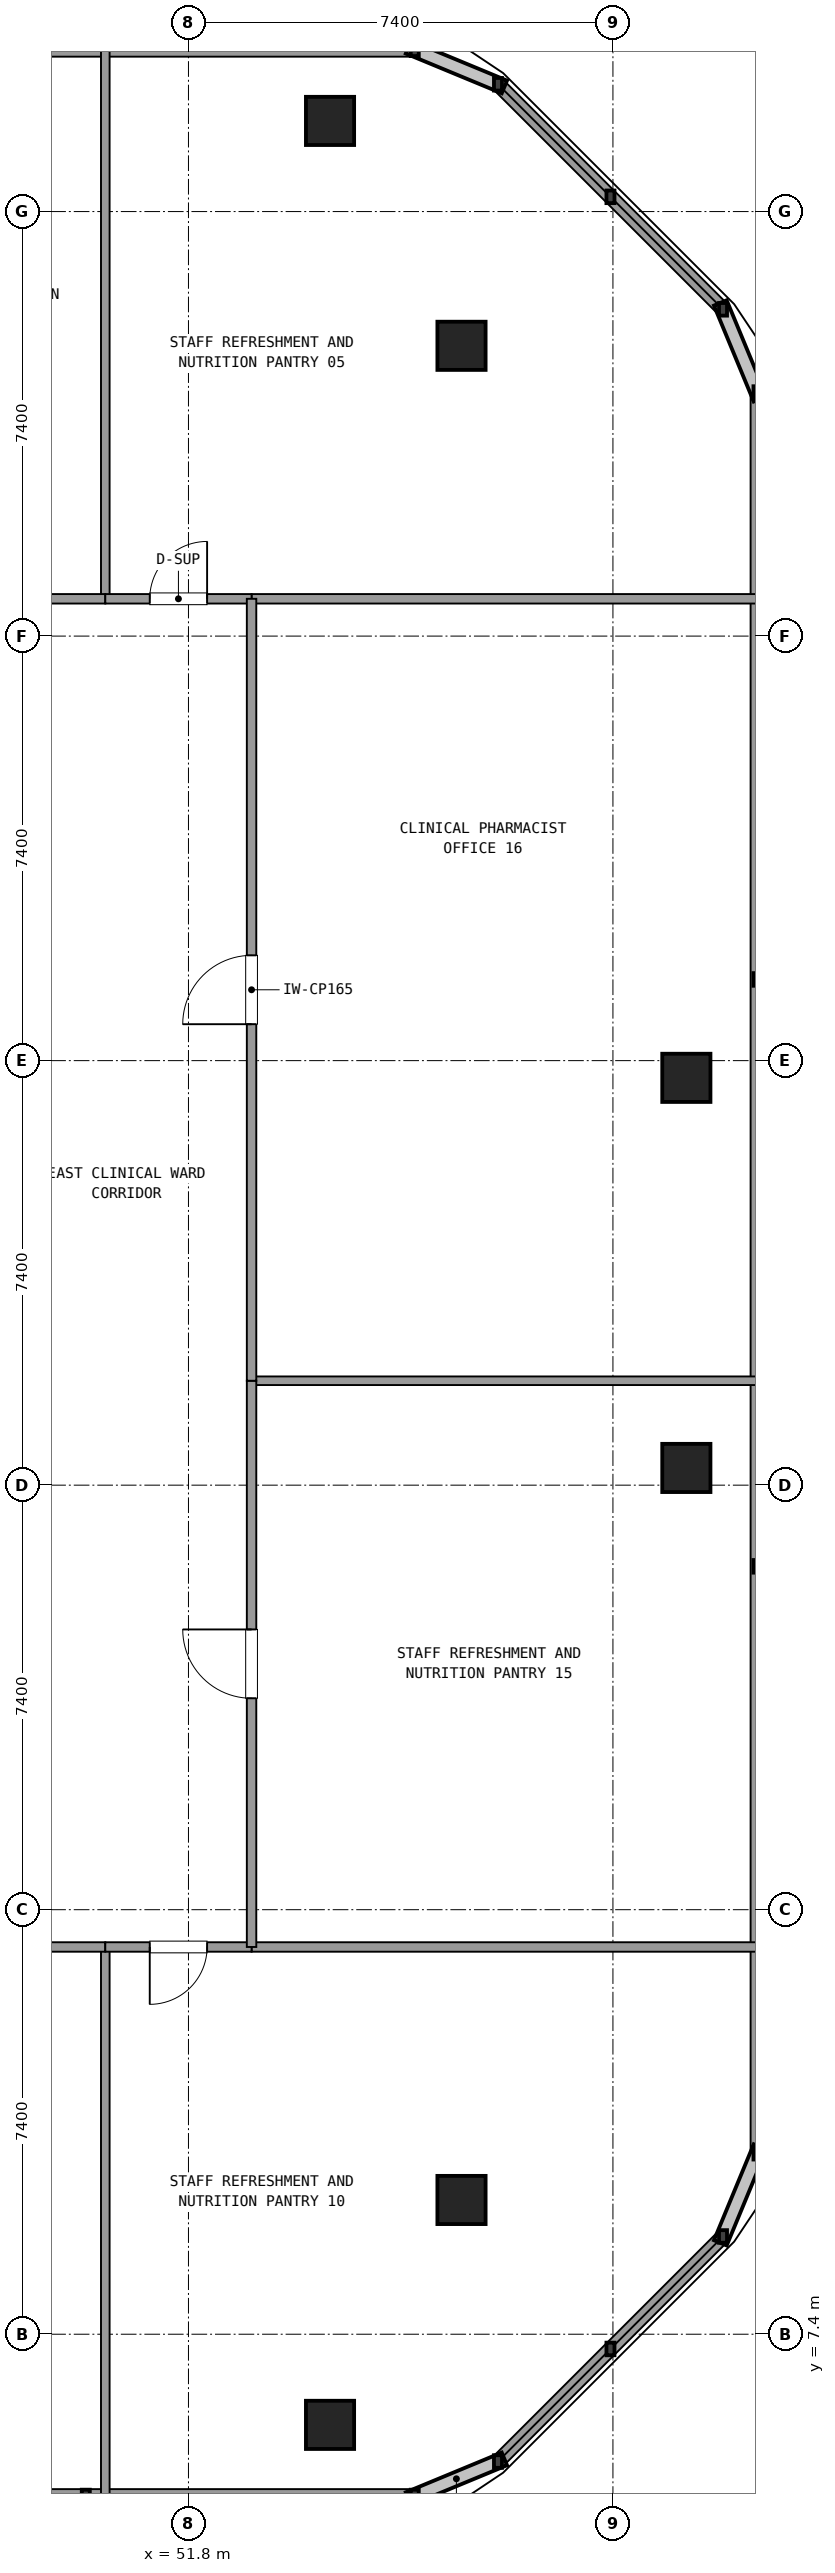
"""IFC4 building model, lengths in metres.
Left out: names, types, materials, properties, quantities, classifications, styles, units other than length and angle.
Written with IfcOpenShell. Run it as: python <this file> out.ifc"""

import sys

from ifc_helpers import new_model, si_unit, direction, frame, frame_2d, origin, origin_2d, place, context, subcontext, project, spatial, rectangle, extrude, element, fill, save


model = new_model("IFC4")
c1 = context("Model", 3, precision=1e-05, world=origin(), true_north=direction((0.0, 1.0)))
c2 = subcontext(c1, "Body", "Model", "MODEL_VIEW")
j1 = project(units=[si_unit("LENGTHUNIT", "METRE"), si_unit("PLANEANGLEUNIT", "RADIAN")], contexts=[c1])
p1 = place(None, origin())
s1 = spatial("IfcSite", under=j1, at=p1, CompositionType="ELEMENT")
p2 = place(p1, origin())
s2 = spatial("IfcBuilding", under=s1, at=p2, CompositionType="ELEMENT")
p3 = place(p2, frame((0.0, 0.0, 250.02)))
s3 = spatial("IfcBuildingStorey", under=s2, at=p3, CompositionType="ELEMENT", Elevation=250.02)
for number, where, z_axis, x_axis in (
    (1, (54.268, 5.82, 0.0), (0.0, 0.0, 1.0), (1.0, 0.0, 0.0)),
    (2, (56.56, 9.74, 0.0), (0.0, 0.0, 1.0), (1.0, 0.0, 0.0)),
    (3, (60.48, 22.5, 0.0), (0.0, 0.0, 1.0), (1.0, 0.0, 0.0)),
    (4, (60.48, 29.3, 0.0), (0.0, 0.0, 1.0), (1.0, 0.0, 0.0)),
    (5, (56.56, 42.06, 0.0), (0.0, 0.0, 1.0), (1.0, 0.0, 0.0)),
    (6, (54.268, 45.98, 0.0), (0.0, 0.0, 1.0), (1.0, 0.0, 0.0)),
):
    element("IfcColumn", number, at=place(p3, frame(where, z_axis=z_axis, x_axis=x_axis)), inside=s3, PredefinedType="COLUMN", context=c2, shape_type="SweptSolid", body=[
        extrude(rectangle(XDim=0.84, YDim=0.84, at=origin_2d()), origin(), (0.0, 0.0, 1.0), 3.6),
    ])
p4 = place(p3, frame((38.539, 4.58, 0.0), z_axis=(0.0, 0.0, 1.0), x_axis=(1.0, 0.0, 0.0)))
e7 = element("IfcWall", 7, at=p4, inside=s3, PredefinedType="SOLIDWALL", context=c2, shape_type="SweptSolid", body=[
    extrude(rectangle(XDim=17.206, YDim=0.24, at=frame_2d((8.603, 0.0))), origin(), (0.0, 0.0, 1.0), 0.85),
])
p5 = place(p3, frame((57.196, 5.181, 0.0), z_axis=(0.0, 0.0, 1.0), x_axis=(0.707084777957, 0.707128783731, 0.0)))
e8 = element("IfcWall", 8, at=p5, inside=s3, PredefinedType="SOLIDWALL", context=c2, shape_type="SweptSolid", body=[
    extrude(rectangle(XDim=5.548, YDim=0.24, at=frame_2d((2.774, 0.0))), origin(), (0.0, 0.0, 1.0), 0.85),
])
p6 = place(p3, frame((61.72, 10.555, 0.0), z_axis=(0.0, 0.0, 1.0), x_axis=(0.0, 1.0, 0.0)))
e9 = element("IfcWall", 9, at=p6, inside=s3, PredefinedType="SOLIDWALL", context=c2, shape_type="SweptSolid", body=[
    extrude(rectangle(XDim=30.69, YDim=0.24, at=frame_2d((15.345, 0.0))), origin(), (0.0, 0.0, 1.0), 0.85),
])
p7 = place(p3, frame((61.119, 42.696, 0.0), z_axis=(0.0, 0.0, 1.0), x_axis=(-0.707106781187, 0.707106781187, 0.0)))
e10 = element("IfcWall", 10, at=p7, inside=s3, PredefinedType="SOLIDWALL", context=c2, shape_type="SweptSolid", body=[
    extrude(rectangle(XDim=5.548, YDim=0.24, at=frame_2d((2.774, 0.0))), origin(), (0.0, 0.0, 1.0), 0.85),
])
p8 = place(p3, frame((55.745, 47.22, 0.0), z_axis=(0.0, 0.0, 1.0), x_axis=(-1.0, 0.0, 0.0)))
e11 = element("IfcWall", 11, at=p8, inside=s3, PredefinedType="SOLIDWALL", context=c2, shape_type="SweptSolid", body=[
    extrude(rectangle(XDim=37.49, YDim=0.24, at=frame_2d((18.745, 0.0))), origin(), (0.0, 0.0, 1.0), 0.85),
])
for number, where, z_axis, x_axis in (
    (12, (52.9, 37.65, 0.0), (0.0, 0.0, 1.0), (1.0, 0.0, 0.0)),
    (13, (52.9, 14.15, 0.0), (0.0, 0.0, 1.0), (1.0, 0.0, 0.0)),
):
    element("IfcWall", number, at=place(p3, frame(where, z_axis=z_axis, x_axis=x_axis)), inside=s3, PredefinedType="PARTITIONING", context=c2, shape_type="SweptSolid", body=[
        extrude(rectangle(XDim=8.8, YDim=0.165, at=frame_2d((4.4, 0.0))), origin(), (0.0, 0.0, 1.0), 2.61),
    ])
p9 = place(p3, frame((50.35, 37.65, 0.0), z_axis=(0.0, 0.0, 1.0), x_axis=(0.0, 1.0, 0.0)))
e14 = element("IfcWall", 14, at=p9, inside=s3, PredefinedType="PARTITIONING", context=c2, shape_type="SweptSolid", body=[
    extrude(rectangle(XDim=9.55, YDim=0.15, at=frame_2d((4.775, 0.0))), origin(), (0.0, 0.0, 1.0), 2.61),
])
p10 = place(p3, frame((45.525, 37.65, 0.0), z_axis=(0.0, 0.0, 1.0), x_axis=(1.0, 0.0, 0.0)))
e15 = element("IfcWall", 15, at=p10, inside=s3, PredefinedType="PARTITIONING", context=c2, shape_type="SweptSolid", body=[
    extrude(rectangle(XDim=4.825, YDim=0.165, at=frame_2d((2.413, 0.0))), origin(), (0.0, 0.0, 1.0), 2.61),
])
p11 = place(p10, frame((1.813, 0.0, 0.0)))
e16 = element("IfcOpeningElement", 16, at=p11, cuts=e15, PredefinedType="OPENING", context=c2, shape_type="SweptSolid", body=[
    extrude(rectangle(XDim=1.2, YDim=2.15, at=frame_2d((0.6, 1.075))), frame((0.0, 0.093, 0.0), z_axis=(0.0, -1.0, 0.0), x_axis=(1.0, 0.0, 0.0)), (0.0, 0.0, 1.0), 0.185),
])
p12 = place(p3, frame((50.35, 37.65, 0.0), z_axis=(0.0, 0.0, 1.0), x_axis=(1.0, 0.0, 0.0)))
e17 = element("IfcWall", 17, at=p12, inside=s3, PredefinedType="PARTITIONING", context=c2, shape_type="SweptSolid", body=[
    extrude(rectangle(XDim=2.55, YDim=0.165, at=frame_2d((1.275, 0.0))), origin(), (0.0, 0.0, 1.0), 2.61),
])
p13 = place(p12, frame((0.775, 0.0, 0.0)))
e18 = element("IfcOpeningElement", 18, at=p13, cuts=e17, PredefinedType="OPENING", context=c2, shape_type="SweptSolid", body=[
    extrude(rectangle(XDim=1.0, YDim=2.15, at=frame_2d((0.5, 1.075))), frame((0.0, 0.093, 0.0), z_axis=(0.0, -1.0, 0.0), x_axis=(1.0, 0.0, 0.0)), (0.0, 0.0, 1.0), 0.185),
])
p14 = place(p3, frame((50.35, 14.15, 0.0), z_axis=(0.0, 0.0, 1.0), x_axis=(0.0, -1.0, 0.0)))
e19 = element("IfcWall", 19, at=p14, inside=s3, PredefinedType="PARTITIONING", context=c2, shape_type="SweptSolid", body=[
    extrude(rectangle(XDim=9.55, YDim=0.15, at=frame_2d((4.775, 0.0))), origin(), (0.0, 0.0, 1.0), 2.61),
])
p15 = place(p3, frame((45.051, 14.15, 0.0), z_axis=(0.0, 0.0, 1.0), x_axis=(1.0, 0.0, 0.0)))
e20 = element("IfcWall", 20, at=p15, inside=s3, PredefinedType="PARTITIONING", context=c2, shape_type="SweptSolid", body=[
    extrude(rectangle(XDim=5.299, YDim=0.165, at=frame_2d((2.649, 0.0))), origin(), (0.0, 0.0, 1.0), 2.61),
])
p16 = place(p15, frame((2.049, 0.0, 0.0)))
e21 = element("IfcOpeningElement", 21, at=p16, cuts=e20, PredefinedType="OPENING", context=c2, shape_type="SweptSolid", body=[
    extrude(rectangle(XDim=1.2, YDim=2.15, at=frame_2d((0.6, 1.075))), frame((0.0, 0.093, 0.0), z_axis=(0.0, -1.0, 0.0), x_axis=(1.0, 0.0, 0.0)), (0.0, 0.0, 1.0), 0.185),
])
p17 = place(p3, frame((50.35, 14.15, 0.0), z_axis=(0.0, 0.0, 1.0), x_axis=(1.0, 0.0, 0.0)))
e22 = element("IfcWall", 22, at=p17, inside=s3, PredefinedType="PARTITIONING", context=c2, shape_type="SweptSolid", body=[
    extrude(rectangle(XDim=2.55, YDim=0.165, at=frame_2d((1.275, 0.0))), origin(), (0.0, 0.0, 1.0), 2.61),
])
p18 = place(p17, frame((0.775, 0.0, 0.0)))
e23 = element("IfcOpeningElement", 23, at=p18, cuts=e22, PredefinedType="OPENING", context=c2, shape_type="SweptSolid", body=[
    extrude(rectangle(XDim=1.0, YDim=2.15, at=frame_2d((0.5, 1.075))), frame((0.0, 0.093, 0.0), z_axis=(0.0, -1.0, 0.0), x_axis=(1.0, 0.0, 0.0)), (0.0, 0.0, 1.0), 0.185),
])
p19 = place(p3, frame((52.9, 24.02, 0.0), z_axis=(0.0, 0.0, 1.0), x_axis=(1.0, 0.0, 0.0)))
e24 = element("IfcWall", 24, at=p19, inside=s3, PredefinedType="PARTITIONING", context=c2, shape_type="SweptSolid", body=[
    extrude(rectangle(XDim=8.8, YDim=0.15, at=frame_2d((4.4, 0.0))), origin(), (0.0, 0.0, 1.0), 2.61),
])
p20 = place(p3, frame((52.9, 14.15, 0.0), z_axis=(0.0, 0.0, 1.0), x_axis=(0.0, 1.0, 0.0)))
e25 = element("IfcWall", 25, at=p20, inside=s3, PredefinedType="PARTITIONING", context=c2, shape_type="SweptSolid", body=[
    extrude(rectangle(XDim=9.87, YDim=0.165, at=frame_2d((4.935, 0.0))), origin(), (0.0, 0.0, 1.0), 2.61),
])
p21 = place(p20, frame((4.335, 0.0, 0.0)))
e26 = element("IfcOpeningElement", 26, at=p21, cuts=e25, PredefinedType="OPENING", context=c2, shape_type="SweptSolid", body=[
    extrude(rectangle(XDim=1.2, YDim=2.15, at=frame_2d((0.6, 1.075))), frame((0.0, 0.093, 0.0), z_axis=(0.0, -1.0, 0.0), x_axis=(1.0, 0.0, 0.0)), (0.0, 0.0, 1.0), 0.185),
])
p22 = place(p3, frame((52.9, 24.02, 0.0), z_axis=(0.0, 0.0, 1.0), x_axis=(0.0, 1.0, 0.0)))
e27 = element("IfcWall", 27, at=p22, inside=s3, PredefinedType="PARTITIONING", context=c2, shape_type="SweptSolid", body=[
    extrude(rectangle(XDim=13.63, YDim=0.165, at=frame_2d((6.815, 0.0))), origin(), (0.0, 0.0, 1.0), 2.61),
])
p23 = place(p22, frame((6.215, 0.0, 0.0)))
e28 = element("IfcOpeningElement", 28, at=p23, cuts=e27, PredefinedType="OPENING", context=c2, shape_type="SweptSolid", body=[
    extrude(rectangle(XDim=1.2, YDim=2.15, at=frame_2d((0.6, 1.075))), frame((0.0, 0.093, 0.0), z_axis=(0.0, -1.0, 0.0), x_axis=(1.0, 0.0, 0.0)), (0.0, 0.0, 1.0), 0.185),
])
p24 = place(p13, origin())
e29 = element("IfcDoor", 29, at=p24, inside=s3, OperationType="SINGLE_SWING_RIGHT", PredefinedType="DOOR", context=c2, shape_type="SweptSolid", body=[
    extrude(rectangle(XDim=1.0, YDim=2.15, at=frame_2d((0.5, 1.075))), frame((0.0, 0.025, 0.0), z_axis=(0.0, -1.0, 0.0), x_axis=(1.0, 0.0, 0.0)), (0.0, 0.0, 1.0), 0.05),
])
fill(e18, e29)
p25 = place(p18, frame((1.0, 0.0, 0.0), z_axis=(0.0, 0.0, 1.0), x_axis=(-1.0, 0.0, 0.0)))
e30 = element("IfcDoor", 30, at=p25, inside=s3, OperationType="SINGLE_SWING_LEFT", PredefinedType="DOOR", context=c2, shape_type="SweptSolid", body=[
    extrude(rectangle(XDim=1.0, YDim=2.15, at=frame_2d((0.5, 1.075))), frame((0.0, 0.025, 0.0), z_axis=(0.0, -1.0, 0.0), x_axis=(1.0, 0.0, 0.0)), (0.0, 0.0, 1.0), 0.05),
])
fill(e23, e30)
p26 = place(p21, origin())
e31 = element("IfcDoor", 31, at=p26, inside=s3, OperationType="SINGLE_SWING_RIGHT", PredefinedType="DOOR", context=c2, shape_type="SweptSolid", body=[
    extrude(rectangle(XDim=1.2, YDim=2.15, at=frame_2d((0.6, 1.075))), frame((0.0, 0.025, 0.0), z_axis=(0.0, -1.0, 0.0), x_axis=(1.0, 0.0, 0.0)), (0.0, 0.0, 1.0), 0.05),
])
fill(e26, e31)
p27 = place(p23, origin())
e32 = element("IfcDoor", 32, at=p27, inside=s3, OperationType="SINGLE_SWING_LEFT", PredefinedType="DOOR", context=c2, shape_type="SweptSolid", body=[
    extrude(rectangle(XDim=1.2, YDim=2.15, at=frame_2d((0.6, 1.075))), frame((0.0, 0.025, 0.0), z_axis=(0.0, -1.0, 0.0), x_axis=(1.0, 0.0, 0.0)), (0.0, 0.0, 1.0), 0.05),
])
fill(e28, e32)
save(model, sys.argv[1])
